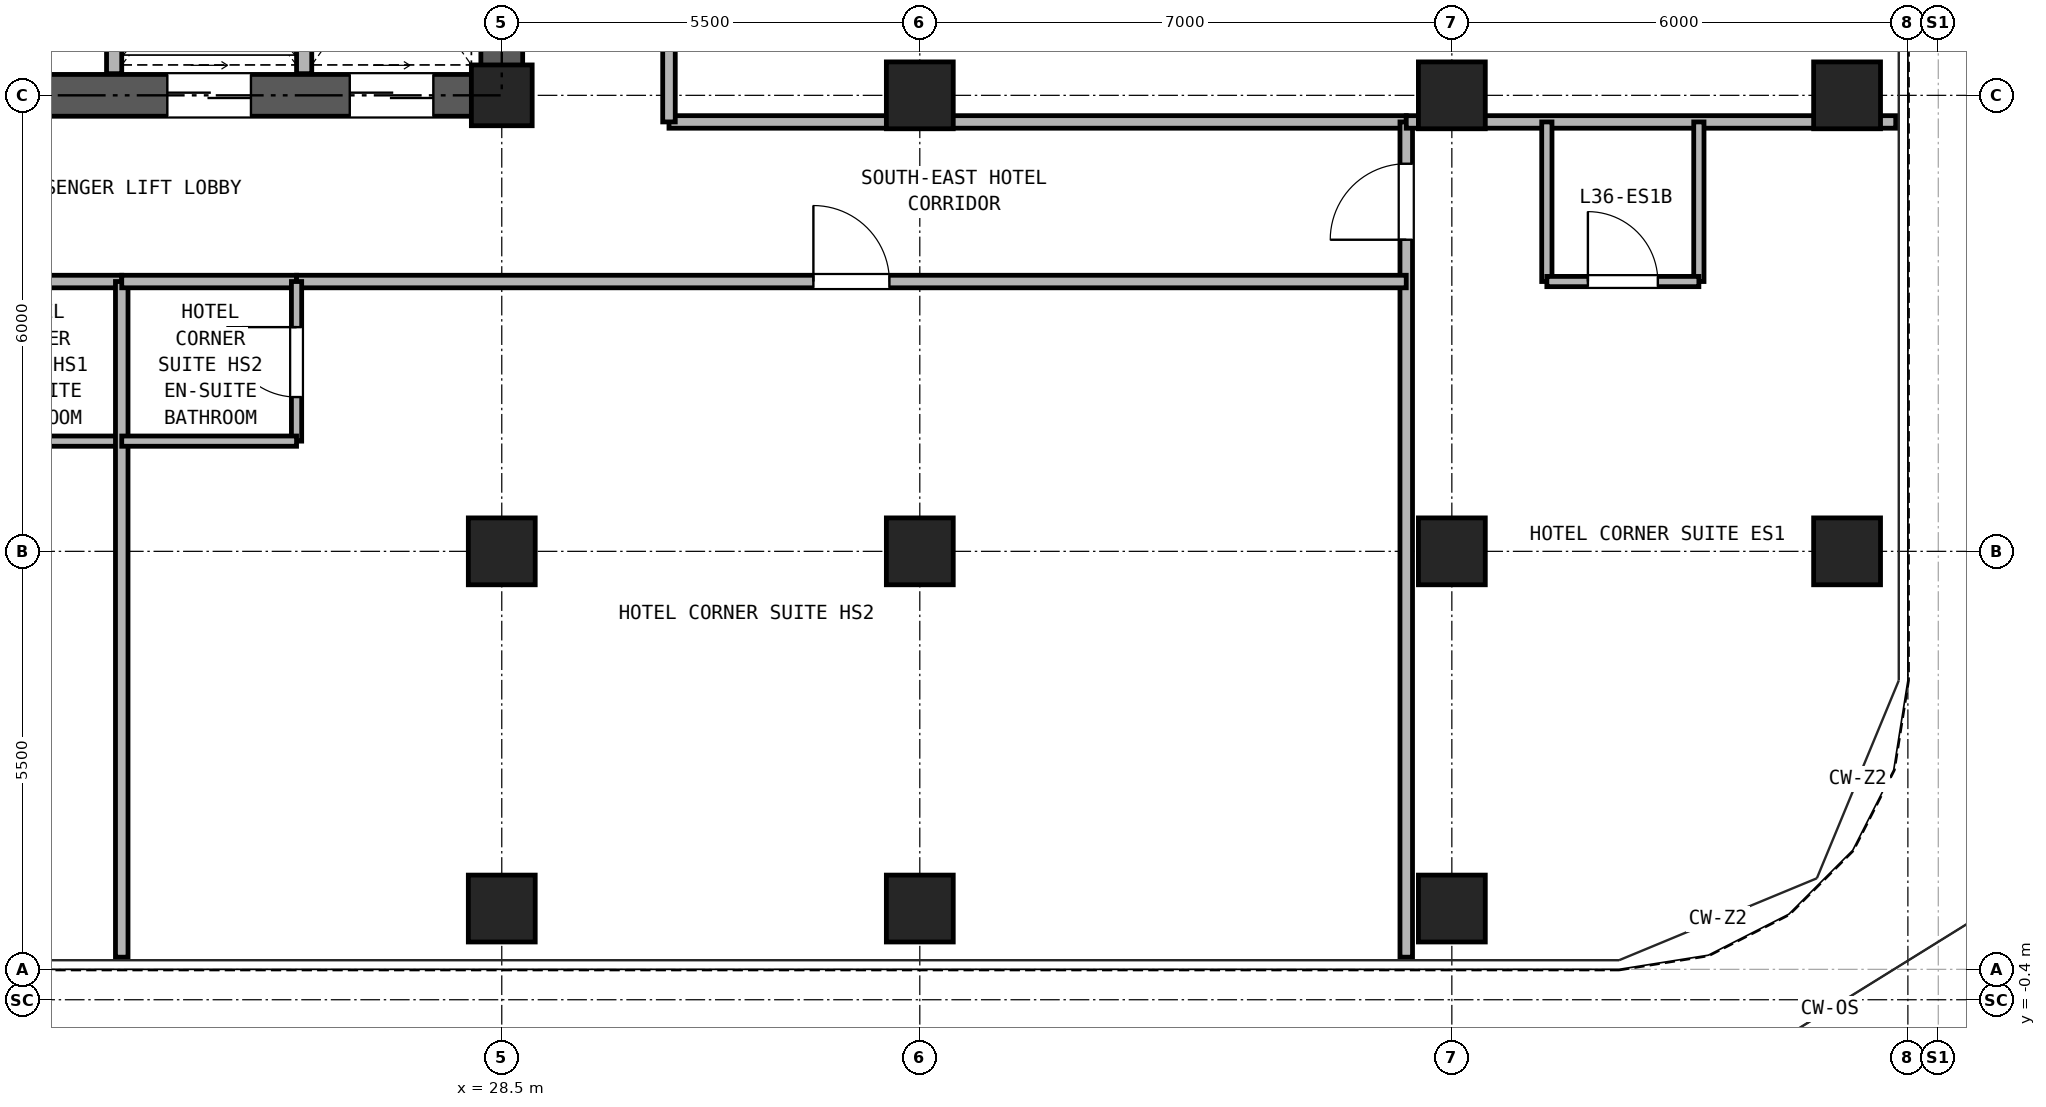
"""IFC4 building model, lengths in metres.
Left out: names, types, materials, properties, quantities, classifications, styles, units other than length and angle.
Written with IfcOpenShell. Run it as: python <this file> out.ifc"""

import sys

from ifc_helpers import new_model, si_unit, direction, frame, frame_2d, origin, origin_2d, place, context, subcontext, project, spatial, rectangle, hollow_rectangle, extrude, source, transform, mapped, element, fill, save


model = new_model("IFC4")
c1 = context("Model", 3, precision=1e-05, world=origin(), true_north=direction((0.0, 1.0)))
c2 = subcontext(c1, "Body", "Model", "MODEL_VIEW")
j1 = project(units=[si_unit("LENGTHUNIT", "METRE"), si_unit("PLANEANGLEUNIT", "RADIAN")], contexts=[c1])
p1 = place(None, origin())
s1 = spatial("IfcSite", under=j1, at=p1, CompositionType="ELEMENT")
p2 = place(p1, origin())
s2 = spatial("IfcBuilding", under=s1, at=p2, CompositionType="ELEMENT")
p3 = place(p2, frame((0.0, 0.0, 131.1)))
s3 = spatial("IfcBuildingStorey", under=s2, at=p3, CompositionType="ELEMENT", Elevation=131.1)
m1 = source(origin(), c2, "Body", "SweptSolid", [
    extrude(hollow_rectangle(XDim=0.88, YDim=0.88, WallThickness=0.05, at=origin_2d()), origin(), (0.0, 0.0, 1.0), 2.95),
])
for number, where, z_axis, x_axis in (
    (1, (28.5, 0.8, 0.0), (0.0, 0.0, 1.0), (1.0, 0.0, 0.0)),
    (2, (34.0, 0.8, 0.0), (0.0, 0.0, 1.0), (1.0, 0.0, 0.0)),
    (3, (41.0, 0.8, 0.0), (0.0, 0.0, 1.0), (1.0, 0.0, 0.0)),
    (4, (46.2, 5.5, 0.0), (0.0, 0.0, 1.0), (1.0, 0.0, 0.0)),
    (5, (46.2, 11.5, 0.0), (0.0, 0.0, 1.0), (1.0, 0.0, 0.0)),
    (6, (28.5, 5.5, 0.0), (0.0, 0.0, 1.0), (1.0, 0.0, 0.0)),
):
    element("IfcColumn", number, at=place(p3, frame(where, z_axis=z_axis, x_axis=x_axis)), inside=s3, PredefinedType="COLUMN", context=c2, shape_type="MappedRepresentation", body=[
        mapped(m1, transform((0.0, 0.0, 0.0), x_axis=(1.0, 0.0, 0.0), y_axis=(0.0, 1.0, 0.0), z_axis=(0.0, 0.0, 1.0), scale=1.0)),
    ])
m2 = source(origin(), c2, "Body", "SweptSolid", [
    extrude(hollow_rectangle(XDim=0.8, YDim=0.8, WallThickness=0.045, at=origin_2d()), origin(), (0.0, 0.0, 1.0), 2.95),
])
p4 = place(p3, frame((28.5, 11.5, 0.0), z_axis=(0.0, 0.0, 1.0), x_axis=(1.0, 0.0, 0.0)))
e7 = element("IfcColumn", 7, at=p4, inside=s3, PredefinedType="COLUMN", context=c2, shape_type="MappedRepresentation", body=[
    mapped(m2, transform((0.0, 0.0, 0.0), x_axis=(1.0, 0.0, 0.0), y_axis=(0.0, 1.0, 0.0), z_axis=(0.0, 0.0, 1.0), scale=1.0)),
])
for number, where, z_axis, x_axis in (
    (8, (34.0, 5.5, 0.0), (0.0, 0.0, 1.0), (1.0, 0.0, 0.0)),
    (9, (34.0, 11.5, 0.0), (0.0, 0.0, 1.0), (1.0, 0.0, 0.0)),
    (10, (41.0, 5.5, 0.0), (0.0, 0.0, 1.0), (1.0, 0.0, 0.0)),
    (11, (41.0, 11.5, 0.0), (0.0, 0.0, 1.0), (1.0, 0.0, 0.0)),
):
    element("IfcColumn", number, at=place(p3, frame(where, z_axis=z_axis, x_axis=x_axis)), inside=s3, PredefinedType="COLUMN", context=c2, shape_type="MappedRepresentation", body=[
        mapped(m1, transform((0.0, 0.0, 0.0), x_axis=(1.0, 0.0, 0.0), y_axis=(0.0, 1.0, 0.0), z_axis=(0.0, 0.0, 1.0), scale=1.0)),
    ])
p5 = place(p3, frame((18.225, 11.5, 0.0), z_axis=(0.0, 0.0, 1.0), x_axis=(1.0, 0.0, 0.0)))
e12 = element("IfcWall", 12, at=p5, inside=s3, PredefinedType="SHEAR", context=c2, shape_type="SweptSolid", body=[
    extrude(rectangle(XDim=10.55, YDim=0.55, at=frame_2d((5.275, 0.0))), origin(), (0.0, 0.0, 1.0), 2.95),
])
p6 = place(p5, frame((2.375, 0.0, 0.0)))
e13 = element("IfcOpeningElement", 13, at=p6, cuts=e12, PredefinedType="OPENING", context=c2, shape_type="SweptSolid", body=[
    extrude(rectangle(XDim=0.95, YDim=2.15, at=frame_2d((0.475, 1.075))), frame((0.0, 0.285, 0.0), z_axis=(0.0, -1.0, 0.0), x_axis=(1.0, 0.0, 0.0)), (0.0, 0.0, 1.0), 0.57),
])
p7 = place(p5, frame((5.875, 0.0, 0.0)))
e14 = element("IfcOpeningElement", 14, at=p7, cuts=e12, PredefinedType="OPENING", context=c2, shape_type="SweptSolid", body=[
    extrude(rectangle(XDim=1.1, YDim=2.25, at=frame_2d((0.55, 1.125))), frame((0.0, 0.285, 0.0), z_axis=(0.0, -1.0, 0.0), x_axis=(1.0, 0.0, 0.0)), (0.0, 0.0, 1.0), 0.57),
])
p8 = place(p5, frame((8.275, 0.0, 0.0)))
e15 = element("IfcOpeningElement", 15, at=p8, cuts=e12, PredefinedType="OPENING", context=c2, shape_type="SweptSolid", body=[
    extrude(rectangle(XDim=1.1, YDim=2.25, at=frame_2d((0.55, 1.125))), frame((0.0, 0.285, 0.0), z_axis=(0.0, -1.0, 0.0), x_axis=(1.0, 0.0, 0.0)), (0.0, 0.0, 1.0), 0.57),
])
p9 = place(p3, frame((28.5, 11.775, 0.0), z_axis=(0.0, 0.0, 1.0), x_axis=(0.0, 1.0, 0.0)))
e16 = element("IfcWall", 16, at=p9, inside=s3, PredefinedType="SHEAR", context=c2, shape_type="SweptSolid", body=[
    extrude(rectangle(XDim=16.7, YDim=0.55, at=frame_2d((8.35, 0.0))), origin(), (0.0, 0.0, 1.0), 2.95),
])
p10 = place(p9, frame((7.375, 0.0, 0.0)))
e17 = element("IfcOpeningElement", 17, at=p10, cuts=e16, PredefinedType="OPENING", context=c2, shape_type="SweptSolid", body=[
    extrude(rectangle(XDim=1.15, YDim=2.2, at=frame_2d((0.575, 1.1))), frame((0.0, 0.285, 0.0), z_axis=(0.0, -1.0, 0.0), x_axis=(1.0, 0.0, 0.0)), (0.0, 0.0, 1.0), 0.57),
])
for number, where, z_axis, x_axis in (
    (18, (23.4, 11.785, 0.0), (0.0, 0.0, 1.0), (0.0, 1.0, 0.0)),
    (19, (25.9, 11.785, 0.0), (0.0, 0.0, 1.0), (0.0, 1.0, 0.0)),
):
    element("IfcWall", number, at=place(p3, frame(where, z_axis=z_axis, x_axis=x_axis)), inside=s3, PredefinedType="PARTITIONING", context=c2, shape_type="SweptSolid", body=[
        extrude(rectangle(XDim=3.215, YDim=0.2, at=frame_2d((1.607, 0.0))), origin(), (0.0, 0.0, 1.0), 2.95),
    ])
p11 = place(p3, frame((30.7, 11.15, 0.0), z_axis=(0.0, 0.0, 1.0), x_axis=(1.0, 0.0, 0.0)))
e20 = element("IfcWall", 20, at=p11, inside=s3, PredefinedType="PARTITIONING", context=c2, shape_type="SweptSolid", body=[
    extrude(rectangle(XDim=9.7, YDim=0.165, at=frame_2d((4.85, 0.0))), origin(), (0.0, 0.0, 1.0), 2.95),
])
p12 = place(p3, frame((30.7, 11.15, 0.0), z_axis=(0.0, 0.0, 1.0), x_axis=(0.0, 1.0, 0.0)))
e21 = element("IfcWall", 21, at=p12, inside=s3, PredefinedType="PARTITIONING", context=c2, shape_type="SweptSolid", body=[
    extrude(rectangle(XDim=18.7, YDim=0.165, at=frame_2d((9.35, 0.0))), origin(), (0.0, 0.0, 1.0), 2.95),
])
p13 = place(p12, frame((4.175, 0.0, 0.0)))
e22 = element("IfcOpeningElement", 22, at=p13, cuts=e21, PredefinedType="OPENING", context=c2, shape_type="SweptSolid", body=[
    extrude(rectangle(XDim=0.95, YDim=2.15, at=frame_2d((0.475, 1.075))), frame((0.0, 0.093, 0.0), z_axis=(0.0, -1.0, 0.0), x_axis=(1.0, 0.0, 0.0)), (0.0, 0.0, 1.0), 0.185),
])
p14 = place(p12, frame((13.525, 0.0, 0.0)))
e23 = element("IfcOpeningElement", 23, at=p14, cuts=e21, PredefinedType="OPENING", context=c2, shape_type="SweptSolid", body=[
    extrude(rectangle(XDim=0.95, YDim=2.15, at=frame_2d((0.475, 1.075))), frame((0.0, 0.093, 0.0), z_axis=(0.0, -1.0, 0.0), x_axis=(1.0, 0.0, 0.0)), (0.0, 0.0, 1.0), 0.185),
])
p15 = place(p3, frame((40.4, 0.16, 0.0), z_axis=(0.0, 0.0, 1.0), x_axis=(0.0, 1.0, 0.0)))
e24 = element("IfcWall", 24, at=p15, inside=s3, PredefinedType="PARTITIONING", context=c2, shape_type="SweptSolid", body=[
    extrude(rectangle(XDim=10.99, YDim=0.165, at=frame_2d((5.495, 0.0))), origin(), (0.0, 0.0, 1.0), 2.95),
])
p16 = place(p15, frame((9.44, 0.0, 0.0)))
e25 = element("IfcOpeningElement", 25, at=p16, cuts=e24, PredefinedType="OPENING", context=c2, shape_type="SweptSolid", body=[
    extrude(rectangle(XDim=1.0, YDim=2.15, at=frame_2d((0.5, 1.075))), frame((0.0, 0.093, 0.0), z_axis=(0.0, -1.0, 0.0), x_axis=(1.0, 0.0, 0.0)), (0.0, 0.0, 1.0), 0.185),
])
p17 = place(p3, frame((40.4, 11.15, 0.0), z_axis=(0.0, 0.0, 1.0), x_axis=(1.0, 0.0, 0.0)))
e26 = element("IfcWall", 26, at=p17, inside=s3, PredefinedType="PARTITIONING", context=c2, shape_type="SweptSolid", body=[
    extrude(rectangle(XDim=6.44, YDim=0.165, at=frame_2d((3.22, 0.0))), origin(), (0.0, 0.0, 1.0), 2.95),
])
for number, where, z_axis, x_axis in (
    (27, (42.25, 9.05, 0.0), (0.0, 0.0, 1.0), (0.0, 1.0, 0.0)),
    (28, (44.25, 9.05, 0.0), (0.0, 0.0, 1.0), (0.0, 1.0, 0.0)),
):
    element("IfcWall", number, at=place(p3, frame(where, z_axis=z_axis, x_axis=x_axis)), inside=s3, PredefinedType="PARTITIONING", context=c2, shape_type="SweptSolid", body=[
        extrude(rectangle(XDim=2.1, YDim=0.135, at=frame_2d((1.05, 0.0))), origin(), (0.0, 0.0, 1.0), 2.95),
    ])
p18 = place(p3, frame((42.25, 9.05, 0.0), z_axis=(0.0, 0.0, 1.0), x_axis=(1.0, 0.0, 0.0)))
e29 = element("IfcWall", 29, at=p18, inside=s3, PredefinedType="PARTITIONING", context=c2, shape_type="SweptSolid", body=[
    extrude(rectangle(XDim=2.0, YDim=0.135, at=frame_2d((1.0, 0.0))), origin(), (0.0, 0.0, 1.0), 2.95),
])
p19 = place(p18, frame((0.54, 0.0, 0.0)))
e30 = element("IfcOpeningElement", 30, at=p19, cuts=e29, PredefinedType="OPENING", context=c2, shape_type="SweptSolid", body=[
    extrude(rectangle(XDim=0.92, YDim=2.1, at=frame_2d((0.46, 1.05))), frame((0.0, 0.077, 0.0), z_axis=(0.0, -1.0, 0.0), x_axis=(1.0, 0.0, 0.0)), (0.0, 0.0, 1.0), 0.155),
])
p20 = place(p3, frame((21.2, 9.05, 0.0), z_axis=(0.0, 0.0, 1.0), x_axis=(1.0, 0.0, 0.0)))
e31 = element("IfcWall", 31, at=p20, inside=s3, PredefinedType="PARTITIONING", context=c2, shape_type="SweptSolid", body=[
    extrude(rectangle(XDim=2.3, YDim=0.165, at=frame_2d((1.15, 0.0))), origin(), (0.0, 0.0, 1.0), 2.95),
])
p21 = place(p3, frame((21.2, 6.95, 0.0), z_axis=(0.0, 0.0, 1.0), x_axis=(1.0, 0.0, 0.0)))
e32 = element("IfcWall", 32, at=p21, inside=s3, PredefinedType="PARTITIONING", context=c2, shape_type="SweptSolid", body=[
    extrude(rectangle(XDim=2.3, YDim=0.135, at=frame_2d((1.15, 0.0))), origin(), (0.0, 0.0, 1.0), 2.95),
])
p22 = place(p3, frame((23.5, 0.16, 0.0), z_axis=(0.0, 0.0, 1.0), x_axis=(0.0, 1.0, 0.0)))
e33 = element("IfcWall", 33, at=p22, inside=s3, PredefinedType="PARTITIONING", context=c2, shape_type="SweptSolid", body=[
    extrude(rectangle(XDim=8.89, YDim=0.165, at=frame_2d((4.445, 0.0))), origin(), (0.0, 0.0, 1.0), 2.95),
])
p23 = place(p3, frame((23.5, 9.05, 0.0), z_axis=(0.0, 0.0, 1.0), x_axis=(1.0, 0.0, 0.0)))
e34 = element("IfcWall", 34, at=p23, inside=s3, PredefinedType="PARTITIONING", context=c2, shape_type="SweptSolid", body=[
    extrude(rectangle(XDim=2.3, YDim=0.165, at=frame_2d((1.15, 0.0))), origin(), (0.0, 0.0, 1.0), 2.95),
])
p24 = place(p3, frame((25.8, 9.05, 0.0), z_axis=(0.0, 0.0, 1.0), x_axis=(1.0, 0.0, 0.0)))
e35 = element("IfcWall", 35, at=p24, inside=s3, PredefinedType="PARTITIONING", context=c2, shape_type="SweptSolid", body=[
    extrude(rectangle(XDim=14.6, YDim=0.165, at=frame_2d((7.3, 0.0))), origin(), (0.0, 0.0, 1.0), 2.95),
])
p25 = place(p24, frame((6.8, 0.0, 0.0)))
e36 = element("IfcOpeningElement", 36, at=p25, cuts=e35, PredefinedType="OPENING", context=c2, shape_type="SweptSolid", body=[
    extrude(rectangle(XDim=1.0, YDim=2.15, at=frame_2d((0.5, 1.075))), frame((0.0, 0.093, 0.0), z_axis=(0.0, -1.0, 0.0), x_axis=(1.0, 0.0, 0.0)), (0.0, 0.0, 1.0), 0.185),
])
p26 = place(p3, frame((25.8, 6.95, 0.0), z_axis=(0.0, 0.0, 1.0), x_axis=(0.0, 1.0, 0.0)))
e37 = element("IfcWall", 37, at=p26, inside=s3, PredefinedType="PARTITIONING", context=c2, shape_type="SweptSolid", body=[
    extrude(rectangle(XDim=2.1, YDim=0.135, at=frame_2d((1.05, 0.0))), origin(), (0.0, 0.0, 1.0), 2.95),
])
p27 = place(p26, frame((0.58, 0.0, 0.0)))
e38 = element("IfcOpeningElement", 38, at=p27, cuts=e37, PredefinedType="OPENING", context=c2, shape_type="SweptSolid", body=[
    extrude(rectangle(XDim=0.92, YDim=2.1, at=frame_2d((0.46, 1.05))), frame((0.0, 0.077, 0.0), z_axis=(0.0, -1.0, 0.0), x_axis=(1.0, 0.0, 0.0)), (0.0, 0.0, 1.0), 0.155),
])
p28 = place(p3, frame((23.5, 6.95, 0.0), z_axis=(0.0, 0.0, 1.0), x_axis=(1.0, 0.0, 0.0)))
e39 = element("IfcWall", 39, at=p28, inside=s3, PredefinedType="PARTITIONING", context=c2, shape_type="SweptSolid", body=[
    extrude(rectangle(XDim=2.3, YDim=0.135, at=frame_2d((1.15, 0.0))), origin(), (0.0, 0.0, 1.0), 2.95),
])
p29 = place(p7, frame((1.1, 0.0, 0.0), z_axis=(0.0, 0.0, 1.0), x_axis=(-1.0, 0.0, 0.0)))
e40 = element("IfcDoor", 40, at=p29, inside=s3, OperationType="DOUBLE_DOOR_SLIDING", PredefinedType="DOOR", context=c2, shape_type="SweptSolid", body=[
    extrude(rectangle(XDim=1.1, YDim=2.25, at=frame_2d((0.55, 1.125))), frame((0.0, 0.025, 0.0), z_axis=(0.0, -1.0, 0.0), x_axis=(1.0, 0.0, 0.0)), (0.0, 0.0, 1.0), 0.05),
])
fill(e14, e40)
p30 = place(p8, frame((1.1, 0.0, 0.0), z_axis=(0.0, 0.0, 1.0), x_axis=(-1.0, 0.0, 0.0)))
e41 = element("IfcDoor", 41, at=p30, inside=s3, OperationType="DOUBLE_DOOR_SLIDING", PredefinedType="DOOR", context=c2, shape_type="SweptSolid", body=[
    extrude(rectangle(XDim=1.1, YDim=2.25, at=frame_2d((0.55, 1.125))), frame((0.0, 0.025, 0.0), z_axis=(0.0, -1.0, 0.0), x_axis=(1.0, 0.0, 0.0)), (0.0, 0.0, 1.0), 0.05),
])
fill(e15, e41)
p31 = place(p19, origin())
e42 = element("IfcDoor", 42, at=p31, inside=s3, OperationType="SINGLE_SWING_LEFT", PredefinedType="DOOR", context=c2, shape_type="SweptSolid", body=[
    extrude(rectangle(XDim=0.92, YDim=2.1, at=frame_2d((0.46, 1.05))), frame((0.0, 0.025, 0.0), z_axis=(0.0, -1.0, 0.0), x_axis=(1.0, 0.0, 0.0)), (0.0, 0.0, 1.0), 0.05),
])
fill(e30, e42)
p32 = place(p16, frame((1.0, 0.0, 0.0), z_axis=(0.0, 0.0, 1.0), x_axis=(-1.0, 0.0, 0.0)))
e43 = element("IfcDoor", 43, at=p32, inside=s3, OperationType="SINGLE_SWING_LEFT", PredefinedType="DOOR", context=c2, shape_type="SweptSolid", body=[
    extrude(rectangle(XDim=1.0, YDim=2.15, at=frame_2d((0.5, 1.075))), frame((0.0, 0.025, 0.0), z_axis=(0.0, -1.0, 0.0), x_axis=(1.0, 0.0, 0.0)), (0.0, 0.0, 1.0), 0.05),
])
fill(e25, e43)
p33 = place(p27, frame((0.92, 0.0, 0.0), z_axis=(0.0, 0.0, 1.0), x_axis=(-1.0, 0.0, 0.0)))
e44 = element("IfcDoor", 44, at=p33, inside=s3, OperationType="SINGLE_SWING_RIGHT", PredefinedType="DOOR", context=c2, shape_type="SweptSolid", body=[
    extrude(rectangle(XDim=0.92, YDim=2.1, at=frame_2d((0.46, 1.05))), frame((0.0, 0.025, 0.0), z_axis=(0.0, -1.0, 0.0), x_axis=(1.0, 0.0, 0.0)), (0.0, 0.0, 1.0), 0.05),
])
fill(e38, e44)
p34 = place(p25, frame((1.0, 0.0, 0.0), z_axis=(0.0, 0.0, 1.0), x_axis=(-1.0, 0.0, 0.0)))
e45 = element("IfcDoor", 45, at=p34, inside=s3, OperationType="SINGLE_SWING_LEFT", PredefinedType="DOOR", context=c2, shape_type="SweptSolid", body=[
    extrude(rectangle(XDim=1.0, YDim=2.15, at=frame_2d((0.5, 1.075))), frame((0.0, 0.025, 0.0), z_axis=(0.0, -1.0, 0.0), x_axis=(1.0, 0.0, 0.0)), (0.0, 0.0, 1.0), 0.05),
])
fill(e36, e45)
save(model, sys.argv[1])
